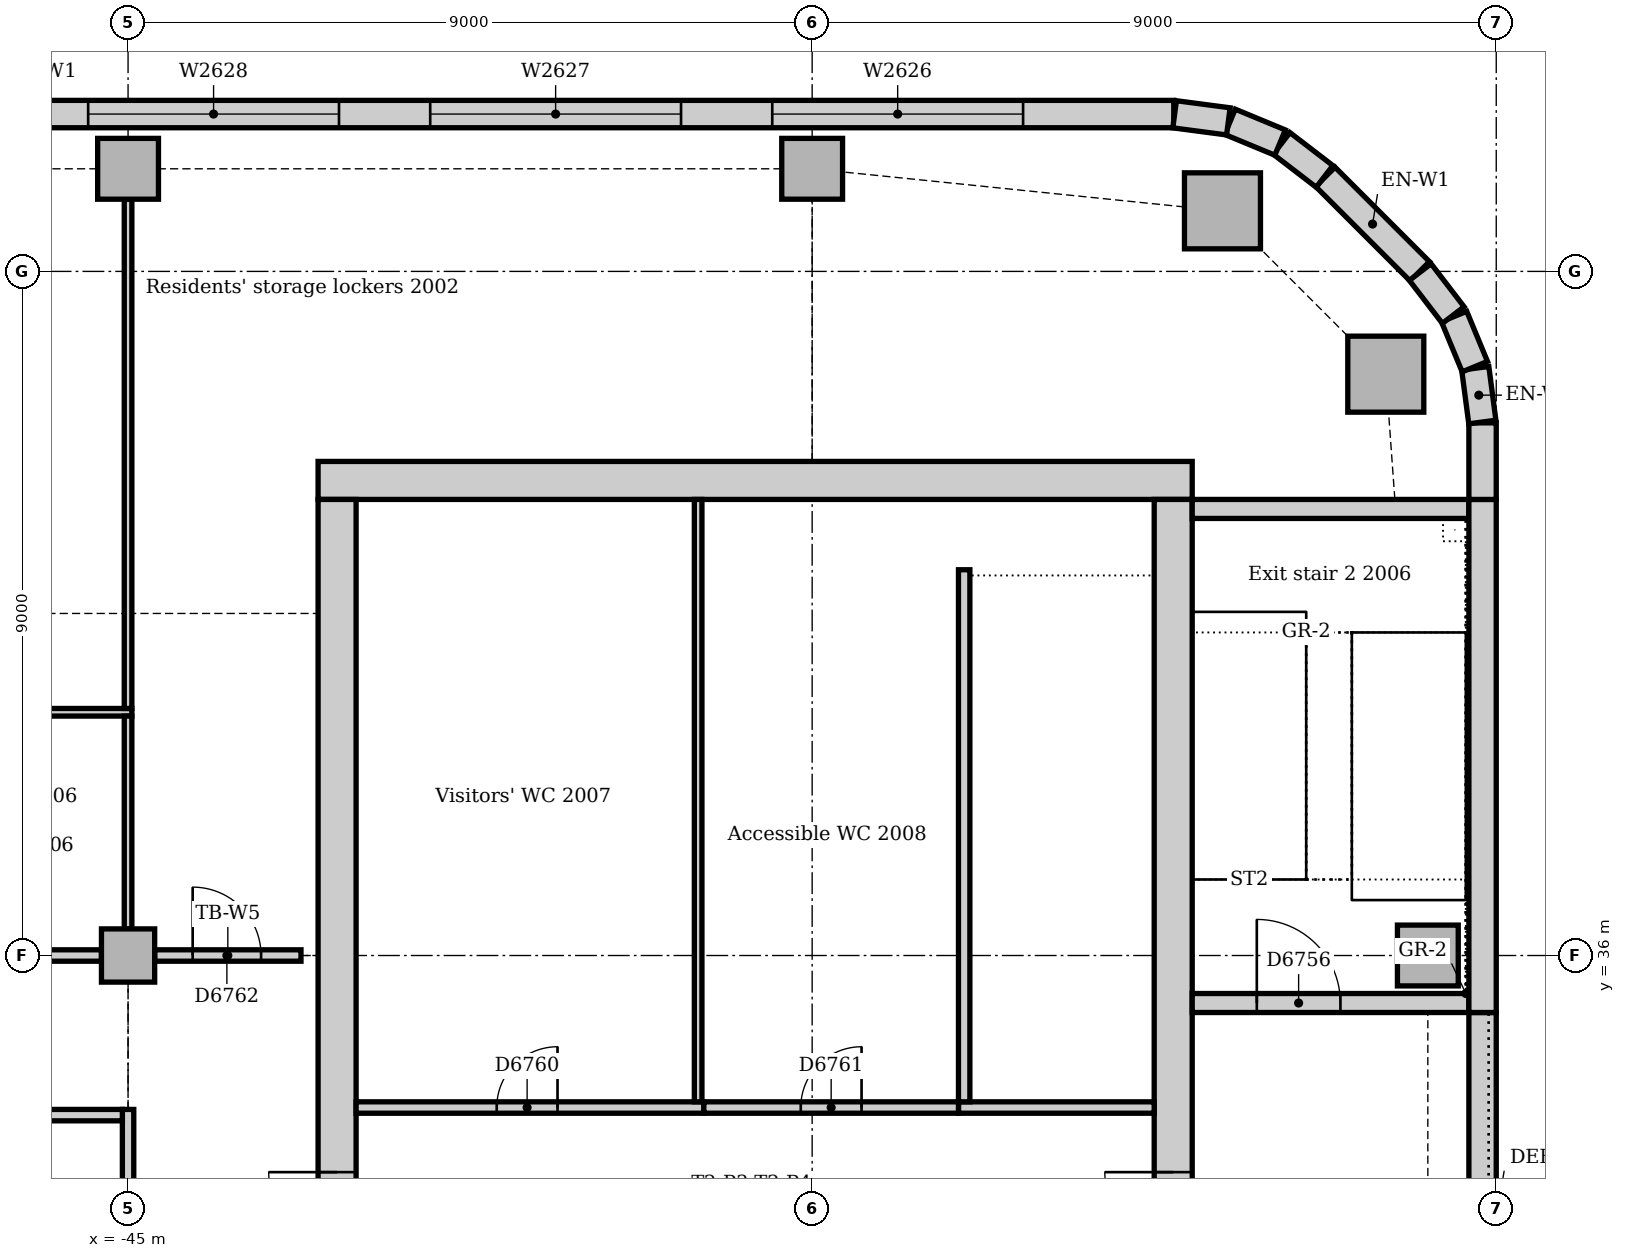
"""IFC4 building model, lengths in metres.
Left out: names, types, materials, properties, quantities, classifications, styles, units other than length and angle.
Written with IfcOpenShell. Run it as: python <this file> out.ifc"""

import sys

from ifc_helpers import new_model, si_unit, direction, frame, frame_2d, origin, origin_2d, place, context, subcontext, project, spatial, rectangle, extrude, element, fill, save


model = new_model("IFC4")
c1 = context("Model", 3, precision=1e-05, world=origin(), true_north=direction((0.0, 1.0)))
c2 = subcontext(c1, "Body", "Model", "MODEL_VIEW")
j1 = project(units=[si_unit("LENGTHUNIT", "METRE"), si_unit("PLANEANGLEUNIT", "RADIAN")], contexts=[c1])
p1 = place(None, origin())
s1 = spatial("IfcSite", under=j1, at=p1, CompositionType="ELEMENT")
p2 = place(p1, origin())
s2 = spatial("IfcBuilding", under=s1, at=p2, CompositionType="ELEMENT")
p3 = place(p2, frame((0.0, 0.0, 87.0)))
s3 = spatial("IfcBuildingStorey", under=s2, at=p3, CompositionType="ELEMENT", Elevation=87.0)
p4 = place(p3, frame((-31.0, 42.25, 0.0), z_axis=(0.0, 0.0, 1.0), x_axis=(-1.0, 0.0, 0.0)))
e1 = element("IfcWall", 1, at=p4, inside=s3, PredefinedType="SOLIDWALL", context=c2, shape_type="SweptSolid", body=[
    extrude(rectangle(XDim=11.5, YDim=0.5, at=frame_2d((5.75, 0.0))), origin(), (0.0, 0.0, 1.0), 4.0),
])
p5 = place(p3, frame((-31.25, 30.5, 0.0), z_axis=(0.0, 0.0, 1.0), x_axis=(0.0, 1.0, 0.0)))
e2 = element("IfcWall", 2, at=p5, inside=s3, PredefinedType="SOLIDWALL", context=c2, shape_type="SweptSolid", body=[
    extrude(rectangle(XDim=11.5, YDim=0.5, at=frame_2d((5.75, 0.0))), origin(), (0.0, 0.0, 1.0), 4.0),
])
p6 = place(p5, frame((0.85, 0.0, 0.0)))
e3 = element("IfcOpeningElement", 3, at=p6, cuts=e2, PredefinedType="OPENING", context=c2, shape_type="SweptSolid", body=[
    extrude(rectangle(XDim=1.8, YDim=2.1, at=frame_2d((0.9, 1.05))), frame((0.0, 0.26, 0.0), z_axis=(0.0, -1.0, 0.0), x_axis=(1.0, 0.0, 0.0)), (0.0, 0.0, 1.0), 0.52),
])
p7 = place(p3, frame((-42.25, 42.0, 0.0), z_axis=(0.0, 0.0, 1.0), x_axis=(0.0, -1.0, 0.0)))
e4 = element("IfcWall", 4, at=p7, inside=s3, PredefinedType="SOLIDWALL", context=c2, shape_type="SweptSolid", body=[
    extrude(rectangle(XDim=11.5, YDim=0.5, at=frame_2d((5.75, 0.0))), origin(), (0.0, 0.0, 1.0), 4.0),
])
p8 = place(p7, frame((8.85, 0.0, 0.0)))
e5 = element("IfcOpeningElement", 5, at=p8, cuts=e4, PredefinedType="OPENING", context=c2, shape_type="SweptSolid", body=[
    extrude(rectangle(XDim=1.8, YDim=2.1, at=frame_2d((0.9, 1.05))), frame((0.0, 0.26, 0.0), z_axis=(0.0, -1.0, 0.0), x_axis=(1.0, 0.0, 0.0)), (0.0, 0.0, 1.0), 0.52),
])
p9 = place(p3, frame((-31.0, 35.375, 0.0), z_axis=(0.0, 0.0, 1.0), x_axis=(1.0, 0.0, 0.0)))
e6 = element("IfcWall", 6, at=p9, inside=s3, PredefinedType="SOLIDWALL", context=c2, shape_type="SweptSolid", body=[
    extrude(rectangle(XDim=3.64, YDim=0.25, at=frame_2d((1.82, 0.0))), origin(), (0.0, 0.0, 1.0), 4.0),
])
p10 = place(p9, frame((0.85, 0.0, 0.0)))
e7 = element("IfcOpeningElement", 7, at=p10, cuts=e6, PredefinedType="OPENING", context=c2, shape_type="SweptSolid", body=[
    extrude(rectangle(XDim=1.1, YDim=2.1, at=frame_2d((0.55, 1.05))), frame((0.0, 0.135, 0.0), z_axis=(0.0, -1.0, 0.0), x_axis=(1.0, 0.0, 0.0)), (0.0, 0.0, 1.0), 0.27),
])
p11 = place(p3, frame((-27.36, 41.875, 0.0), z_axis=(0.0, 0.0, 1.0), x_axis=(-1.0, 0.0, 0.0)))
e8 = element("IfcWall", 8, at=p11, inside=s3, PredefinedType="SOLIDWALL", context=c2, shape_type="SweptSolid", body=[
    extrude(rectangle(XDim=3.64, YDim=0.25, at=frame_2d((1.82, 0.0))), origin(), (0.0, 0.0, 1.0), 4.0),
])
for number, where, z_axis, x_axis in (
    (9, (-28.453, 43.648, 0.0), (0.0, 0.0, 1.0), (1.0, 0.0, 0.0)),
    (10, (-30.602, 45.797, 0.0), (0.0, 0.0, 1.0), (1.0, 0.0, 0.0)),
):
    element("IfcColumn", number, at=place(p3, frame(where, z_axis=z_axis, x_axis=x_axis)), inside=s3, PredefinedType="COLUMN", context=c2, shape_type="SweptSolid", body=[
        extrude(rectangle(XDim=1.0, YDim=1.0, at=origin_2d()), origin(), (0.0, 0.0, 1.0), 3.85),
    ])
p12 = place(p3, frame((-27.9, 36.0, 0.0), z_axis=(0.0, 0.0, 1.0), x_axis=(1.0, 0.0, 0.0)))
e11 = element("IfcColumn", 11, at=p12, inside=s3, PredefinedType="COLUMN", context=c2, shape_type="SweptSolid", body=[
    extrude(rectangle(XDim=0.8, YDim=0.8, at=origin_2d()), origin(), (0.0, 0.0, 1.0), 4.0),
])
for number, where, z_axis, x_axis in (
    (12, (-45.0, 46.35, 0.0), (0.0, 0.0, 1.0), (1.0, 0.0, 0.0)),
    (13, (-36.0, 46.35, 0.0), (0.0, 0.0, 1.0), (1.0, 0.0, 0.0)),
):
    element("IfcColumn", number, at=place(p3, frame(where, z_axis=z_axis, x_axis=x_axis)), inside=s3, PredefinedType="COLUMN", context=c2, shape_type="SweptSolid", body=[
        extrude(rectangle(XDim=0.8, YDim=0.8, at=origin_2d()), origin(), (0.0, 0.0, 1.0), 3.85),
    ])
p13 = place(p3, frame((-45.0, 36.0, 0.0), z_axis=(0.0, 0.0, 1.0), x_axis=(1.0, 0.0, 0.0)))
e14 = element("IfcColumn", 14, at=p13, inside=s3, PredefinedType="COLUMN", context=c2, shape_type="SweptSolid", body=[
    extrude(rectangle(XDim=0.7, YDim=0.7, at=origin_2d()), origin(), (0.0, 0.0, 1.0), 3.85),
])
p14 = place(p3, frame((-27.18, 27.75, 0.0), z_axis=(0.0, 0.0, 1.0), x_axis=(0.0, 1.0, 0.0)))
e15 = element("IfcWall", 15, at=p14, inside=s3, PredefinedType="STANDARD", context=c2, shape_type="SweptSolid", body=[
    extrude(rectangle(XDim=7.5, YDim=0.36, at=frame_2d((3.75, 0.0))), origin(), (0.0, 0.0, 1.0), 3.85),
])
p15 = place(p14, frame((2.85, 0.0, 1.2)))
e16 = element("IfcOpeningElement", 16, at=p15, cuts=e15, PredefinedType="OPENING", context=c2, shape_type="SweptSolid", body=[
    extrude(rectangle(XDim=1.8, YDim=1.2, at=frame_2d((0.9, 0.6))), frame((0.0, 0.19, 0.0), z_axis=(0.0, -1.0, 0.0), x_axis=(1.0, 0.0, 0.0)), (0.0, 0.0, 1.0), 0.38),
])
p16 = place(p3, frame((-27.18, 35.25, 0.0), z_axis=(0.0, 0.0, 1.0), x_axis=(0.0, 1.0, 0.0)))
e17 = element("IfcWall", 17, at=p16, inside=s3, PredefinedType="STANDARD", context=c2, shape_type="SweptSolid", body=[
    extrude(rectangle(XDim=6.75, YDim=0.36, at=frame_2d((3.375, 0.0))), origin(), (0.0, 0.0, 1.0), 3.85),
])
p17 = place(p3, frame((-27.18, 42.0, 0.0), z_axis=(0.0, 0.0, 1.0), x_axis=(0.0, 1.0, 0.0)))
e18 = element("IfcWall", 18, at=p17, inside=s3, PredefinedType="STANDARD", context=c2, shape_type="SweptSolid", body=[
    extrude(rectangle(XDim=1.007, YDim=0.36, at=frame_2d((0.504, 0.0))), origin(), (0.0, 0.0, 1.0), 3.85),
])
p18 = place(p3, frame((-28.006, 45.001, 0.0), z_axis=(0.0, 0.0, 1.0), x_axis=(-0.707106781187, 0.707106781187, 0.0)))
e19 = element("IfcWall", 19, at=p18, inside=s3, PredefinedType="STANDARD", context=c2, shape_type="SweptSolid", body=[
    extrude(rectangle(XDim=1.757, YDim=0.36, at=frame_2d((0.879, 0.0))), origin(), (0.0, 0.0, 1.0), 3.85),
])
p19 = place(p3, frame((-31.243, 47.07, 0.0), z_axis=(0.0, 0.0, 1.0), x_axis=(-1.0, 0.0, 0.0)))
e20 = element("IfcWall", 20, at=p19, inside=s3, PredefinedType="STANDARD", context=c2, shape_type="SweptSolid", body=[
    extrude(rectangle(XDim=29.765, YDim=0.36, at=frame_2d((14.882, 0.0))), origin(), (0.0, 0.0, 1.0), 3.85),
])
p20 = place(p19, frame((1.982, 0.0, 0.9)))
e21 = element("IfcOpeningElement", 21, at=p20, cuts=e20, PredefinedType="OPENING", context=c2, shape_type="SweptSolid", body=[
    extrude(rectangle(XDim=3.3, YDim=1.6, at=frame_2d((1.65, 0.8))), frame((0.0, 0.19, 0.0), z_axis=(0.0, -1.0, 0.0), x_axis=(1.0, 0.0, 0.0)), (0.0, 0.0, 1.0), 0.38),
])
p21 = place(p19, frame((6.482, 0.0, 0.9)))
e22 = element("IfcOpeningElement", 22, at=p21, cuts=e20, PredefinedType="OPENING", context=c2, shape_type="SweptSolid", body=[
    extrude(rectangle(XDim=3.3, YDim=1.6, at=frame_2d((1.65, 0.8))), frame((0.0, 0.19, 0.0), z_axis=(0.0, -1.0, 0.0), x_axis=(1.0, 0.0, 0.0)), (0.0, 0.0, 1.0), 0.38),
])
p22 = place(p19, frame((10.982, 0.0, 0.9)))
e23 = element("IfcOpeningElement", 23, at=p22, cuts=e20, PredefinedType="OPENING", context=c2, shape_type="SweptSolid", body=[
    extrude(rectangle(XDim=3.3, YDim=1.6, at=frame_2d((1.65, 0.8))), frame((0.0, 0.19, 0.0), z_axis=(0.0, -1.0, 0.0), x_axis=(1.0, 0.0, 0.0)), (0.0, 0.0, 1.0), 0.38),
])
p23 = place(p19, frame((15.482, 0.0, 0.9)))
e24 = element("IfcOpeningElement", 24, at=p23, cuts=e20, PredefinedType="OPENING", context=c2, shape_type="SweptSolid", body=[
    extrude(rectangle(XDim=3.3, YDim=1.6, at=frame_2d((1.65, 0.8))), frame((0.0, 0.19, 0.0), z_axis=(0.0, -1.0, 0.0), x_axis=(1.0, 0.0, 0.0)), (0.0, 0.0, 1.0), 0.38),
])
p24 = place(p19, frame((19.982, 0.0, 0.9)))
e25 = element("IfcOpeningElement", 25, at=p24, cuts=e20, PredefinedType="OPENING", context=c2, shape_type="SweptSolid", body=[
    extrude(rectangle(XDim=3.3, YDim=1.6, at=frame_2d((1.65, 0.8))), frame((0.0, 0.19, 0.0), z_axis=(0.0, -1.0, 0.0), x_axis=(1.0, 0.0, 0.0)), (0.0, 0.0, 1.0), 0.38),
])
p25 = place(p19, frame((24.482, 0.0, 0.9)))
e26 = element("IfcOpeningElement", 26, at=p25, cuts=e20, PredefinedType="OPENING", context=c2, shape_type="SweptSolid", body=[
    extrude(rectangle(XDim=3.3, YDim=1.6, at=frame_2d((1.65, 0.8))), frame((0.0, 0.19, 0.0), z_axis=(0.0, -1.0, 0.0), x_axis=(1.0, 0.0, 0.0)), (0.0, 0.0, 1.0), 0.38),
])
for number, where, z_axis, x_axis in (
    (27, (-27.183, 43.019, 0.0), (0.0, 0.0, 1.0), (-0.131, 0.991, 0.0)),
    (28, (-27.282, 43.747, 0.0), (0.0, 0.0, 1.0), (-0.383, 0.924, 0.0)),
):
    element("IfcWall", number, at=place(p3, frame(where, z_axis=z_axis, x_axis=x_axis)), inside=s3, PredefinedType="STANDARD", context=c2, shape_type="SweptSolid", body=[
        extrude(rectangle(XDim=0.713, YDim=0.36, at=frame_2d((0.356, 0.0))), origin(), (0.0, 0.0, 1.0), 3.85),
    ])
for number, where, z_axis, x_axis in (
    (29, (-27.566, 44.425, 0.0), (0.0, 0.0, 1.0), (-0.609, 0.793, 0.0)),
    (30, (-29.259, 46.25, 0.0), (0.0, 0.0, 1.0), (-0.793, 0.609, 0.0)),
):
    element("IfcWall", number, at=place(p3, frame(where, z_axis=z_axis, x_axis=x_axis)), inside=s3, PredefinedType="STANDARD", context=c2, shape_type="SweptSolid", body=[
        extrude(rectangle(XDim=0.713, YDim=0.36, at=frame_2d((0.357, 0.0))), origin(), (0.0, 0.0, 1.0), 3.85),
    ])
for number, where, z_axis, x_axis in (
    (31, (-29.844, 46.695, 0.0), (0.0, 0.0, 1.0), (-0.924, 0.383, 0.0)),
    (32, (-30.524, 46.974, 0.0), (0.0, 0.0, 1.0), (-0.991, 0.131, 0.0)),
):
    element("IfcWall", number, at=place(p3, frame(where, z_axis=z_axis, x_axis=x_axis)), inside=s3, PredefinedType="STANDARD", context=c2, shape_type="SweptSolid", body=[
        extrude(rectangle(XDim=0.713, YDim=0.36, at=frame_2d((0.356, 0.0))), origin(), (0.0, 0.0, 1.0), 3.85),
    ])
p26 = place(p3, frame((-34.075, 34.0, 0.0), z_axis=(0.0, 0.0, 1.0), x_axis=(1.0, 0.0, 0.0)))
e33 = element("IfcWall", 33, at=p26, inside=s3, PredefinedType="SOLIDWALL", context=c2, shape_type="SweptSolid", body=[
    extrude(rectangle(XDim=2.575, YDim=0.15, at=frame_2d((1.288, 0.0))), origin(), (0.0, 0.0, 1.0), 4.0),
])
p27 = place(p3, frame((-34.0, 41.075, 0.0), z_axis=(0.0, 0.0, 1.0), x_axis=(0.0, -1.0, 0.0)))
e34 = element("IfcWall", 34, at=p27, inside=s3, PredefinedType="SOLIDWALL", context=c2, shape_type="SweptSolid", body=[
    extrude(rectangle(XDim=7.0, YDim=0.15, at=frame_2d((3.5, 0.0))), origin(), (0.0, 0.0, 1.0), 4.0),
])
p28 = place(p3, frame((-37.425, 34.0, 0.0), z_axis=(0.0, 0.0, 1.0), x_axis=(-1.0, 0.0, 0.0)))
e35 = element("IfcWall", 35, at=p28, inside=s3, PredefinedType="PARTITIONING", context=c2, shape_type="SweptSolid", body=[
    extrude(rectangle(XDim=4.575, YDim=0.15, at=frame_2d((2.288, 0.0))), origin(), (0.0, 0.0, 1.0), 3.85),
])
p29 = place(p28, frame((1.925, 0.0, 0.0)))
e36 = element("IfcOpeningElement", 36, at=p29, cuts=e35, PredefinedType="OPENING", context=c2, shape_type="SweptSolid", body=[
    extrude(rectangle(XDim=0.8, YDim=2.1, at=frame_2d((0.4, 1.05))), frame((0.0, 0.085, 0.0), z_axis=(0.0, -1.0, 0.0), x_axis=(1.0, 0.0, 0.0)), (0.0, 0.0, 1.0), 0.17),
])
p30 = place(p3, frame((-34.075, 34.0, 0.0), z_axis=(0.0, 0.0, 1.0), x_axis=(-1.0, 0.0, 0.0)))
e37 = element("IfcWall", 37, at=p30, inside=s3, PredefinedType="PARTITIONING", context=c2, shape_type="SweptSolid", body=[
    extrude(rectangle(XDim=3.35, YDim=0.15, at=frame_2d((1.675, 0.0))), origin(), (0.0, 0.0, 1.0), 3.85),
])
p31 = place(p30, frame((1.275, 0.0, 0.0)))
e38 = element("IfcOpeningElement", 38, at=p31, cuts=e37, PredefinedType="OPENING", context=c2, shape_type="SweptSolid", body=[
    extrude(rectangle(XDim=0.8, YDim=2.1, at=frame_2d((0.4, 1.05))), frame((0.0, 0.085, 0.0), z_axis=(0.0, -1.0, 0.0), x_axis=(1.0, 0.0, 0.0)), (0.0, 0.0, 1.0), 0.17),
])
p32 = place(p3, frame((-37.5, 34.075, 0.0), z_axis=(0.0, 0.0, 1.0), x_axis=(0.0, 1.0, 0.0)))
e39 = element("IfcWall", 39, at=p32, inside=s3, PredefinedType="PARTITIONING", context=c2, shape_type="SweptSolid", body=[
    extrude(rectangle(XDim=7.925, YDim=0.1, at=frame_2d((3.962, 0.0))), origin(), (0.0, 0.0, 1.0), 3.85),
])
p33 = place(p3, frame((-44.65, 36.0, 0.0), z_axis=(0.0, 0.0, 1.0), x_axis=(1.0, 0.0, 0.0)))
e40 = element("IfcWall", 40, at=p33, inside=s3, PredefinedType="PARTITIONING", context=c2, shape_type="SweptSolid", body=[
    extrude(rectangle(XDim=1.925, YDim=0.15, at=frame_2d((0.963, 0.0))), origin(), (0.0, 0.0, 1.0), 3.602),
])
p34 = place(p33, frame((0.5, 0.0, 0.0)))
e41 = element("IfcOpeningElement", 41, at=p34, cuts=e40, PredefinedType="OPENING", context=c2, shape_type="SweptSolid", body=[
    extrude(rectangle(XDim=0.9, YDim=2.1, at=frame_2d((0.45, 1.05))), frame((0.0, 0.085, 0.0), z_axis=(0.0, -1.0, 0.0), x_axis=(1.0, 0.0, 0.0)), (0.0, 0.0, 1.0), 0.17),
])
p35 = place(p3, frame((-53.65, 36.0, 0.0), z_axis=(0.0, 0.0, 1.0), x_axis=(1.0, 0.0, 0.0)))
e42 = element("IfcWall", 42, at=p35, inside=s3, PredefinedType="PARTITIONING", context=c2, shape_type="SweptSolid", body=[
    extrude(rectangle(XDim=8.3, YDim=0.15, at=frame_2d((4.15, 0.0))), origin(), (0.0, 0.0, 1.0), 3.158),
])
p36 = place(p35, frame((2.94, 0.0, 0.0)))
e43 = element("IfcOpeningElement", 43, at=p36, cuts=e42, PredefinedType="OPENING", context=c2, shape_type="SweptSolid", body=[
    extrude(rectangle(XDim=1.0, YDim=2.1, at=frame_2d((0.5, 1.05))), frame((0.0, 0.085, 0.0), z_axis=(0.0, -1.0, 0.0), x_axis=(1.0, 0.0, 0.0)), (0.0, 0.0, 1.0), 0.17),
])
p37 = place(p3, frame((-45.0, 27.35, 0.0), z_axis=(0.0, 0.0, 1.0), x_axis=(0.0, 1.0, 0.0)))
e44 = element("IfcWall", 44, at=p37, inside=s3, PredefinedType="PARTITIONING", context=c2, shape_type="SweptSolid", body=[
    extrude(rectangle(XDim=6.625, YDim=0.15, at=frame_2d((3.312, 0.0))), origin(), (0.0, 0.0, 1.0), 3.256),
])
p38 = place(p3, frame((-52.575, 33.9, 0.0), z_axis=(0.0, 0.0, 1.0), x_axis=(1.0, 0.0, 0.0)))
e45 = element("IfcWall", 45, at=p38, inside=s3, PredefinedType="PARTITIONING", context=c2, shape_type="SweptSolid", body=[
    extrude(rectangle(XDim=7.5, YDim=0.15, at=frame_2d((3.75, 0.0))), origin(), (0.0, 0.0, 1.0), 3.85),
])
p39 = place(p3, frame((-53.925, 39.2, 0.0), z_axis=(0.0, 0.0, 1.0), x_axis=(1.0, 0.0, 0.0)))
e46 = element("IfcWall", 46, at=p39, inside=s3, PredefinedType="PARTITIONING", context=c2, shape_type="SweptSolid", body=[
    extrude(rectangle(XDim=8.975, YDim=0.1, at=frame_2d((4.487, 0.0))), origin(), (0.0, 0.0, 1.0), 3.85),
])
p40 = place(p39, frame((3.265, 0.0, 0.0)))
e47 = element("IfcOpeningElement", 47, at=p40, cuts=e46, PredefinedType="OPENING", context=c2, shape_type="SweptSolid", body=[
    extrude(rectangle(XDim=0.9, YDim=2.1, at=frame_2d((0.45, 1.05))), frame((0.0, 0.06, 0.0), z_axis=(0.0, -1.0, 0.0), x_axis=(1.0, 0.0, 0.0)), (0.0, 0.0, 1.0), 0.12),
])
p41 = place(p3, frame((-45.0, 39.25, 0.0), z_axis=(0.0, 0.0, 1.0), x_axis=(0.0, 1.0, 0.0)))
e48 = element("IfcWall", 48, at=p41, inside=s3, PredefinedType="PARTITIONING", context=c2, shape_type="SweptSolid", body=[
    extrude(rectangle(XDim=6.7, YDim=0.1, at=frame_2d((3.35, 0.0))), origin(), (0.0, 0.0, 1.0), 3.256),
])
p42 = place(p3, frame((-45.0, 36.35, 0.0), z_axis=(0.0, 0.0, 1.0), x_axis=(0.0, 1.0, 0.0)))
e49 = element("IfcWall", 49, at=p42, inside=s3, PredefinedType="PARTITIONING", context=c2, shape_type="SweptSolid", body=[
    extrude(rectangle(XDim=2.8, YDim=0.1, at=frame_2d((1.4, 0.0))), origin(), (0.0, 0.0, 1.0), 3.256),
])
p43 = place(p20, origin())
e50 = element("IfcWindow", 50, at=p43, inside=s3, PartitioningType="SINGLE_PANEL", PredefinedType="WINDOW", context=c2, shape_type="SweptSolid", body=[
    extrude(rectangle(XDim=3.3, YDim=1.6, at=frame_2d((1.65, 0.8))), frame((0.0, 0.13, 0.0), z_axis=(0.0, -1.0, 0.0), x_axis=(1.0, 0.0, 0.0)), (0.0, 0.0, 1.0), 0.06),
])
fill(e21, e50)
p44 = place(p21, origin())
e51 = element("IfcWindow", 51, at=p44, inside=s3, PartitioningType="SINGLE_PANEL", PredefinedType="WINDOW", context=c2, shape_type="SweptSolid", body=[
    extrude(rectangle(XDim=3.3, YDim=1.6, at=frame_2d((1.65, 0.8))), frame((0.0, 0.13, 0.0), z_axis=(0.0, -1.0, 0.0), x_axis=(1.0, 0.0, 0.0)), (0.0, 0.0, 1.0), 0.06),
])
fill(e22, e51)
p45 = place(p22, origin())
e52 = element("IfcWindow", 52, at=p45, inside=s3, PartitioningType="SINGLE_PANEL", PredefinedType="WINDOW", context=c2, shape_type="SweptSolid", body=[
    extrude(rectangle(XDim=3.3, YDim=1.6, at=frame_2d((1.65, 0.8))), frame((0.0, 0.13, 0.0), z_axis=(0.0, -1.0, 0.0), x_axis=(1.0, 0.0, 0.0)), (0.0, 0.0, 1.0), 0.06),
])
fill(e23, e52)
p46 = place(p10, origin())
e53 = element("IfcDoor", 53, at=p46, inside=s3, OperationType="SINGLE_SWING_LEFT", PredefinedType="DOOR", context=c2, shape_type="SweptSolid", body=[
    extrude(rectangle(XDim=1.1, YDim=2.1, at=frame_2d((0.55, 1.05))), frame((0.0, 0.025, 0.0), z_axis=(0.0, -1.0, 0.0), x_axis=(1.0, 0.0, 0.0)), (0.0, 0.0, 1.0), 0.05),
])
fill(e7, e53)
p47 = place(p6, origin())
e54 = element("IfcDoor", 54, at=p47, inside=s3, OperationType="DOUBLE_DOOR_SINGLE_SWING", PredefinedType="DOOR", context=c2, shape_type="SweptSolid", body=[
    extrude(rectangle(XDim=1.8, YDim=2.1, at=frame_2d((0.9, 1.05))), frame((0.0, 0.025, 0.0), z_axis=(0.0, -1.0, 0.0), x_axis=(1.0, 0.0, 0.0)), (0.0, 0.0, 1.0), 0.05),
])
fill(e3, e54)
p48 = place(p8, frame((1.8, 0.0, 0.0), z_axis=(0.0, 0.0, 1.0), x_axis=(-1.0, 0.0, 0.0)))
e55 = element("IfcDoor", 55, at=p48, inside=s3, OperationType="DOUBLE_DOOR_SINGLE_SWING", PredefinedType="DOOR", context=c2, shape_type="SweptSolid", body=[
    extrude(rectangle(XDim=1.8, YDim=2.1, at=frame_2d((0.9, 1.05))), frame((0.0, 0.025, 0.0), z_axis=(0.0, -1.0, 0.0), x_axis=(1.0, 0.0, 0.0)), (0.0, 0.0, 1.0), 0.05),
])
fill(e5, e55)
p49 = place(p29, frame((0.8, 0.0, 0.0), z_axis=(0.0, 0.0, 1.0), x_axis=(-1.0, 0.0, 0.0)))
e56 = element("IfcDoor", 56, at=p49, inside=s3, OperationType="SINGLE_SWING_RIGHT", PredefinedType="DOOR", context=c2, shape_type="SweptSolid", body=[
    extrude(rectangle(XDim=0.8, YDim=2.1, at=frame_2d((0.4, 1.05))), frame((0.0, 0.025, 0.0), z_axis=(0.0, -1.0, 0.0), x_axis=(1.0, 0.0, 0.0)), (0.0, 0.0, 1.0), 0.05),
])
fill(e36, e56)
p50 = place(p31, frame((0.8, 0.0, 0.0), z_axis=(0.0, 0.0, 1.0), x_axis=(-1.0, 0.0, 0.0)))
e57 = element("IfcDoor", 57, at=p50, inside=s3, OperationType="SINGLE_SWING_RIGHT", PredefinedType="DOOR", context=c2, shape_type="SweptSolid", body=[
    extrude(rectangle(XDim=0.8, YDim=2.1, at=frame_2d((0.4, 1.05))), frame((0.0, 0.025, 0.0), z_axis=(0.0, -1.0, 0.0), x_axis=(1.0, 0.0, 0.0)), (0.0, 0.0, 1.0), 0.05),
])
fill(e38, e57)
p51 = place(p34, origin())
e58 = element("IfcDoor", 58, at=p51, inside=s3, OperationType="SINGLE_SWING_LEFT", PredefinedType="DOOR", context=c2, shape_type="SweptSolid", body=[
    extrude(rectangle(XDim=0.9, YDim=2.1, at=frame_2d((0.45, 1.05))), frame((0.0, 0.025, 0.0), z_axis=(0.0, -1.0, 0.0), x_axis=(1.0, 0.0, 0.0)), (0.0, 0.0, 1.0), 0.05),
])
fill(e41, e58)
save(model, sys.argv[1])
